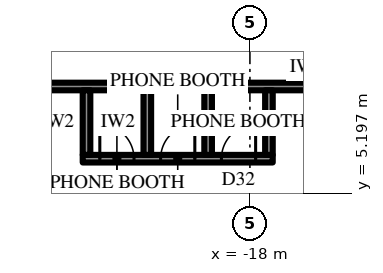
"""IFC4 building model, lengths in metres.
Left out: names, types, materials, properties, quantities, classifications, styles, units other than length and angle.
Written with IfcOpenShell. Run it as: python <this file> out.ifc"""

import sys

from ifc_helpers import new_model, si_unit, direction, frame, frame_2d, origin, place, context, subcontext, project, spatial, rectangle, extrude, element, fill, save


model = new_model("IFC4")
c1 = context("Model", 3, precision=1e-05, world=origin(), true_north=direction((0.0, 1.0)))
c2 = subcontext(c1, "Body", "Model", "MODEL_VIEW")
j1 = project(units=[si_unit("LENGTHUNIT", "METRE"), si_unit("PLANEANGLEUNIT", "RADIAN")], contexts=[c1])
p1 = place(None, origin())
s1 = spatial("IfcSite", under=j1, at=p1, CompositionType="ELEMENT")
p2 = place(p1, origin())
s2 = spatial("IfcBuilding", under=s1, at=p2, CompositionType="ELEMENT")
p3 = place(p2, frame((0.0, 0.0, 349.3)))
s3 = spatial("IfcBuildingStorey", under=s2, at=p3, CompositionType="ELEMENT", Elevation=349.3)
p4 = place(p3, frame((-12.425, 8.0, 0.0), z_axis=(0.0, 0.0, 1.0), x_axis=(-1.0, 0.0, 0.0)))
e1 = element("IfcWall", 1, at=p4, inside=s3, PredefinedType="PARTITIONING", context=c2, shape_type="SweptSolid", body=[
    extrude(rectangle(XDim=13.59, YDim=0.2, at=frame_2d((6.795, 0.0))), origin(), (0.0, 0.0, 1.0), 4.0),
])
p5 = place(p4, frame((0.859, 0.0, 0.0)))
e2 = element("IfcOpeningElement", 2, at=p5, cuts=e1, PredefinedType="OPENING", context=c2, shape_type="SweptSolid", body=[
    extrude(rectangle(XDim=1.0, YDim=2.2, at=frame_2d((0.5, 1.1))), frame((0.0, 0.11, 0.0), z_axis=(0.0, -1.0, 0.0), x_axis=(1.0, 0.0, 0.0)), (0.0, 0.0, 1.0), 0.22),
])
p6 = place(p3, frame((-17.4, 6.1, 0.0), z_axis=(0.0, 0.0, 1.0), x_axis=(-1.0, 0.0, 0.0)))
e3 = element("IfcWall", 3, at=p6, inside=s3, PredefinedType="PARTITIONING", context=c2, shape_type="SweptSolid", body=[
    extrude(rectangle(XDim=5.0, YDim=0.2, at=frame_2d((2.5, 0.0))), origin(), (0.0, 0.0, 1.0), 4.0),
])
p7 = place(p6, frame((0.45, 0.0, 0.0)))
e4 = element("IfcOpeningElement", 4, at=p7, cuts=e3, PredefinedType="OPENING", context=c2, shape_type="SweptSolid", body=[
    extrude(rectangle(XDim=0.9, YDim=2.2, at=frame_2d((0.45, 1.1))), frame((0.0, 0.11, 0.0), z_axis=(0.0, -1.0, 0.0), x_axis=(1.0, 0.0, 0.0)), (0.0, 0.0, 1.0), 0.22),
])
p8 = place(p6, frame((2.05, 0.0, 0.0)))
e5 = element("IfcOpeningElement", 5, at=p8, cuts=e3, PredefinedType="OPENING", context=c2, shape_type="SweptSolid", body=[
    extrude(rectangle(XDim=0.9, YDim=2.2, at=frame_2d((0.45, 1.1))), frame((0.0, 0.11, 0.0), z_axis=(0.0, -1.0, 0.0), x_axis=(1.0, 0.0, 0.0)), (0.0, 0.0, 1.0), 0.22),
])
p9 = place(p6, frame((3.65, 0.0, 0.0)))
e6 = element("IfcOpeningElement", 6, at=p9, cuts=e3, PredefinedType="OPENING", context=c2, shape_type="SweptSolid", body=[
    extrude(rectangle(XDim=0.9, YDim=2.2, at=frame_2d((0.45, 1.1))), frame((0.0, 0.11, 0.0), z_axis=(0.0, -1.0, 0.0), x_axis=(1.0, 0.0, 0.0)), (0.0, 0.0, 1.0), 0.22),
])
for number, where, z_axis, x_axis in (
    (7, (-17.5, 7.9, 0.0), (0.0, 0.0, 1.0), (0.0, -1.0, 0.0)),
    (8, (-19.1, 7.9, 0.0), (0.0, 0.0, 1.0), (0.0, -1.0, 0.0)),
    (9, (-20.7, 7.9, 0.0), (0.0, 0.0, 1.0), (0.0, -1.0, 0.0)),
    (10, (-22.3, 7.9, 0.0), (0.0, 0.0, 1.0), (0.0, -1.0, 0.0)),
):
    element("IfcWall", number, at=place(p3, frame(where, z_axis=z_axis, x_axis=x_axis)), inside=s3, PredefinedType="PARTITIONING", context=c2, shape_type="SweptSolid", body=[
        extrude(rectangle(XDim=1.7, YDim=0.2, at=frame_2d((0.85, 0.0))), origin(), (0.0, 0.0, 1.0), 4.0),
    ])
p10 = place(p7, frame((0.9, 0.0, 0.0), z_axis=(0.0, 0.0, 1.0), x_axis=(-1.0, 0.0, 0.0)))
e11 = element("IfcDoor", 11, at=p10, inside=s3, OperationType="SINGLE_SWING_LEFT", PredefinedType="DOOR", context=c2, shape_type="SweptSolid", body=[
    extrude(rectangle(XDim=0.9, YDim=2.2, at=frame_2d((0.45, 1.1))), frame((0.0, 0.025, 0.0), z_axis=(0.0, -1.0, 0.0), x_axis=(1.0, 0.0, 0.0)), (0.0, 0.0, 1.0), 0.05),
])
fill(e4, e11)
p11 = place(p8, frame((0.9, 0.0, 0.0), z_axis=(0.0, 0.0, 1.0), x_axis=(-1.0, 0.0, 0.0)))
e12 = element("IfcDoor", 12, at=p11, inside=s3, OperationType="SINGLE_SWING_LEFT", PredefinedType="DOOR", context=c2, shape_type="SweptSolid", body=[
    extrude(rectangle(XDim=0.9, YDim=2.2, at=frame_2d((0.45, 1.1))), frame((0.0, 0.025, 0.0), z_axis=(0.0, -1.0, 0.0), x_axis=(1.0, 0.0, 0.0)), (0.0, 0.0, 1.0), 0.05),
])
fill(e5, e12)
p12 = place(p9, frame((0.9, 0.0, 0.0), z_axis=(0.0, 0.0, 1.0), x_axis=(-1.0, 0.0, 0.0)))
e13 = element("IfcDoor", 13, at=p12, inside=s3, OperationType="SINGLE_SWING_RIGHT", PredefinedType="DOOR", context=c2, shape_type="SweptSolid", body=[
    extrude(rectangle(XDim=0.9, YDim=2.2, at=frame_2d((0.45, 1.1))), frame((0.0, 0.025, 0.0), z_axis=(0.0, -1.0, 0.0), x_axis=(1.0, 0.0, 0.0)), (0.0, 0.0, 1.0), 0.05),
])
fill(e6, e13)
save(model, sys.argv[1])
